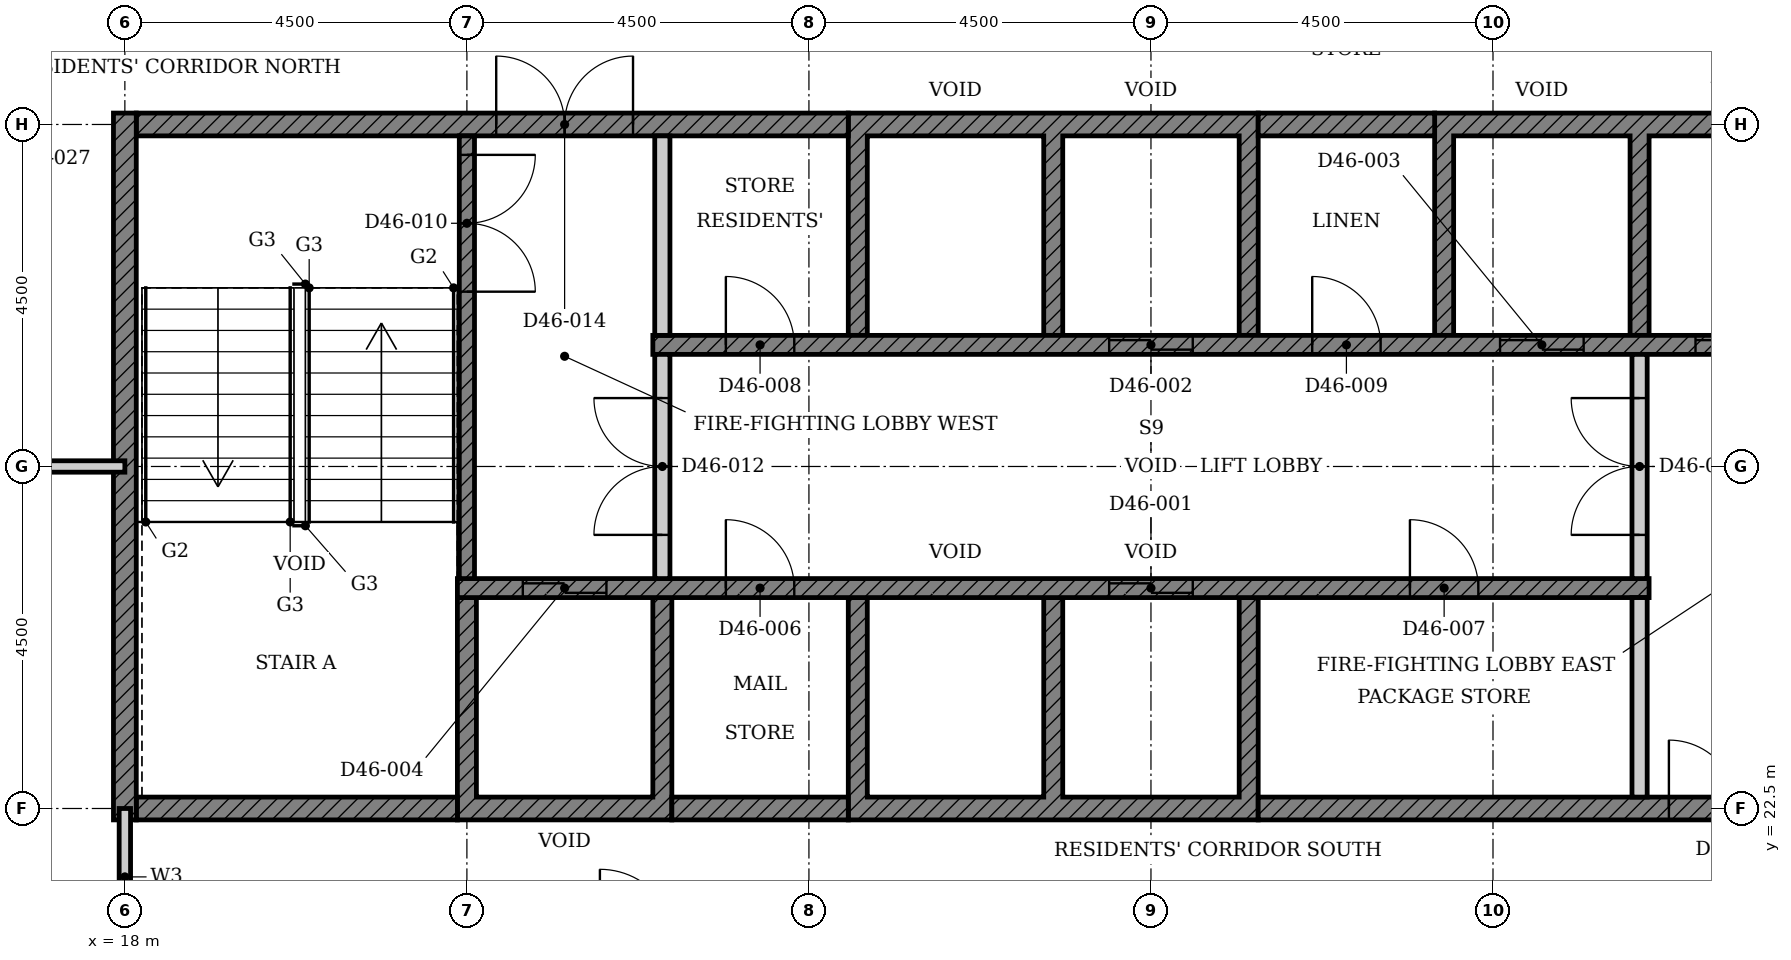
"""IFC4 building model, lengths in metres.
Left out: names, types, materials, properties, quantities, classifications, styles, units other than length and angle.
Written with IfcOpenShell. Run it as: python <this file> out.ifc"""

import sys

from ifc_helpers import new_model, si_unit, direction, frame, frame_2d, origin, place, context, subcontext, project, spatial, polyline, rectangle, outline, extrude, element, fill, save


model = new_model("IFC4")
c1 = context("Model", 3, precision=1e-05, world=origin(), true_north=direction((0.0, 1.0)))
c2 = subcontext(c1, "Body", "Model", "MODEL_VIEW")
j1 = project(units=[si_unit("LENGTHUNIT", "METRE"), si_unit("PLANEANGLEUNIT", "RADIAN")], contexts=[c1])
p1 = place(None, origin())
s1 = spatial("IfcSite", under=j1, at=p1, CompositionType="ELEMENT")
p2 = place(p1, origin())
s2 = spatial("IfcBuilding", under=s1, at=p2, CompositionType="ELEMENT")
p3 = place(p2, frame((0.0, 0.0, 183.9)))
s3 = spatial("IfcBuildingStorey", under=s2, at=p3, CompositionType="ELEMENT", Elevation=183.9)
p4 = place(p3, origin())
e1 = element("IfcWall", 1, at=p4, inside=s3, PredefinedType="SHEAR", context=c2, shape_type="SweptSolid", body=[
    extrude(outline(polyline([(22.375, 22.35), (25.197, 22.35), (25.197, 25.275), (24.947, 25.275), (24.947, 22.65), (22.625, 22.65), (22.625, 25.275), (22.375, 25.275), (22.375, 22.35)])), origin(), (0.0, 0.0, 1.0), 3.3),
])
p5 = place(p3, origin())
e2 = element("IfcWall", 2, at=p5, inside=s3, PredefinedType="SHEAR", context=c2, shape_type="SweptSolid", body=[
    extrude(outline(polyline([(27.518, 22.35), (32.911, 22.35), (32.911, 25.275), (32.661, 25.275), (32.661, 22.65), (30.339, 22.65), (30.339, 25.275), (30.089, 25.275), (30.089, 22.65), (27.768, 22.65), (27.768, 25.275), (27.518, 25.275), (27.518, 22.35)])), origin(), (0.0, 0.0, 1.0), 3.3),
])
p6 = place(p3, origin())
e3 = element("IfcWall", 3, at=p6, inside=s3, PredefinedType="SHEAR", context=c2, shape_type="SweptSolid", body=[
    extrude(outline(polyline([(27.518, 28.725), (27.768, 28.725), (27.768, 31.35), (30.089, 31.35), (30.089, 28.725), (30.339, 28.725), (30.339, 31.35), (32.661, 31.35), (32.661, 28.725), (32.911, 28.725), (32.911, 31.65), (27.518, 31.65), (27.518, 28.725)])), origin(), (0.0, 0.0, 1.0), 3.3),
])
p7 = place(p3, origin())
e4 = element("IfcWall", 4, at=p7, inside=s3, PredefinedType="SHEAR", context=c2, shape_type="SweptSolid", body=[
    extrude(outline(polyline([(35.232, 28.725), (35.482, 28.725), (35.482, 31.35), (37.803, 31.35), (37.803, 28.725), (38.053, 28.725), (38.053, 31.35), (40.375, 31.35), (40.375, 28.725), (40.625, 28.725), (40.625, 31.65), (35.232, 31.65), (35.232, 28.725)])), origin(), (0.0, 0.0, 1.0), 3.3),
])
p8 = place(p3, frame((18.15, 22.5, 0.0), z_axis=(0.0, 0.0, 1.0), x_axis=(1.0, 0.0, 0.0)))
e5 = element("IfcWall", 5, at=p8, inside=s3, PredefinedType="SHEAR", context=c2, shape_type="SweptSolid", body=[
    extrude(rectangle(XDim=4.225, YDim=0.3, at=frame_2d((2.113, 0.0))), origin(), (0.0, 0.0, 1.0), 3.3),
])
p9 = place(p3, frame((25.197, 22.5, 0.0), z_axis=(0.0, 0.0, 1.0), x_axis=(1.0, 0.0, 0.0)))
e6 = element("IfcWall", 6, at=p9, inside=s3, PredefinedType="SHEAR", context=c2, shape_type="SweptSolid", body=[
    extrude(rectangle(XDim=2.321, YDim=0.3, at=frame_2d((1.161, 0.0))), origin(), (0.0, 0.0, 1.0), 3.3),
])
p10 = place(p3, frame((32.911, 22.5, 0.0), z_axis=(0.0, 0.0, 1.0), x_axis=(1.0, 0.0, 0.0)))
e7 = element("IfcWall", 7, at=p10, inside=s3, PredefinedType="SHEAR", context=c2, shape_type="SweptSolid", body=[
    extrude(rectangle(XDim=11.939, YDim=0.3, at=frame_2d((5.97, 0.0))), origin(), (0.0, 0.0, 1.0), 3.3),
])
p11 = place(p10, frame((5.404, 0.0, 0.0)))
e8 = element("IfcOpeningElement", 8, at=p11, cuts=e7, PredefinedType="OPENING", context=c2, shape_type="SweptSolid", body=[
    extrude(rectangle(XDim=1.8, YDim=2.1, at=frame_2d((0.9, 1.05))), frame((0.0, 0.16, 0.0), z_axis=(0.0, -1.0, 0.0), x_axis=(1.0, 0.0, 0.0)), (0.0, 0.0, 1.0), 0.32),
])
p12 = place(p3, frame((18.15, 31.5, 0.0), z_axis=(0.0, 0.0, 1.0), x_axis=(1.0, 0.0, 0.0)))
e9 = element("IfcWall", 9, at=p12, inside=s3, PredefinedType="SHEAR", context=c2, shape_type="SweptSolid", body=[
    extrude(rectangle(XDim=9.368, YDim=0.3, at=frame_2d((4.684, 0.0))), origin(), (0.0, 0.0, 1.0), 3.3),
])
p13 = place(p12, frame((4.736, 0.0, 0.0)))
e10 = element("IfcOpeningElement", 10, at=p13, cuts=e9, PredefinedType="OPENING", context=c2, shape_type="SweptSolid", body=[
    extrude(rectangle(XDim=1.8, YDim=2.1, at=frame_2d((0.9, 1.05))), frame((0.0, 0.16, 0.0), z_axis=(0.0, -1.0, 0.0), x_axis=(1.0, 0.0, 0.0)), (0.0, 0.0, 1.0), 0.32),
])
p14 = place(p3, frame((32.911, 31.5, 0.0), z_axis=(0.0, 0.0, 1.0), x_axis=(1.0, 0.0, 0.0)))
e11 = element("IfcWall", 11, at=p14, inside=s3, PredefinedType="SHEAR", context=c2, shape_type="SweptSolid", body=[
    extrude(rectangle(XDim=2.322, YDim=0.3, at=frame_2d((1.161, 0.0))), origin(), (0.0, 0.0, 1.0), 3.3),
])
p15 = place(p3, frame((18.0, 22.35, 0.0), z_axis=(0.0, 0.0, 1.0), x_axis=(0.0, 1.0, 0.0)))
e12 = element("IfcWall", 12, at=p15, inside=s3, PredefinedType="SHEAR", context=c2, shape_type="SweptSolid", body=[
    extrude(rectangle(XDim=9.3, YDim=0.3, at=frame_2d((4.65, 0.0))), origin(), (0.0, 0.0, 1.0), 3.3),
])
p16 = place(p3, frame((22.375, 25.4, 0.0), z_axis=(0.0, 0.0, 1.0), x_axis=(1.0, 0.0, 0.0)))
e13 = element("IfcWall", 13, at=p16, inside=s3, PredefinedType="SHEAR", context=c2, shape_type="SweptSolid", body=[
    extrude(rectangle(XDim=15.678, YDim=0.25, at=frame_2d((7.839, 0.0))), origin(), (0.0, 0.0, 1.0), 3.3),
])
p17 = place(p16, frame((8.575, 0.0, 0.0)))
e14 = element("IfcOpeningElement", 14, at=p17, cuts=e13, PredefinedType="OPENING", context=c2, shape_type="SweptSolid", body=[
    extrude(rectangle(XDim=1.1, YDim=2.1, at=frame_2d((0.55, 1.05))), frame((0.0, 0.135, 0.0), z_axis=(0.0, -1.0, 0.0), x_axis=(1.0, 0.0, 0.0)), (0.0, 0.0, 1.0), 0.27),
])
p18 = place(p16, frame((0.861, 0.0, 0.0)))
e15 = element("IfcOpeningElement", 15, at=p18, cuts=e13, PredefinedType="OPENING", context=c2, shape_type="SweptSolid", body=[
    extrude(rectangle(XDim=1.1, YDim=2.1, at=frame_2d((0.55, 1.05))), frame((0.0, 0.135, 0.0), z_axis=(0.0, -1.0, 0.0), x_axis=(1.0, 0.0, 0.0)), (0.0, 0.0, 1.0), 0.27),
])
p19 = place(p16, frame((3.532, 0.0, 0.0)))
e16 = element("IfcOpeningElement", 16, at=p19, cuts=e13, PredefinedType="OPENING", context=c2, shape_type="SweptSolid", body=[
    extrude(rectangle(XDim=0.9, YDim=2.1, at=frame_2d((0.45, 1.05))), frame((0.0, 0.135, 0.0), z_axis=(0.0, -1.0, 0.0), x_axis=(1.0, 0.0, 0.0)), (0.0, 0.0, 1.0), 0.27),
])
p20 = place(p16, frame((12.532, 0.0, 0.0)))
e17 = element("IfcOpeningElement", 17, at=p20, cuts=e13, PredefinedType="OPENING", context=c2, shape_type="SweptSolid", body=[
    extrude(rectangle(XDim=0.9, YDim=2.1, at=frame_2d((0.45, 1.05))), frame((0.0, 0.135, 0.0), z_axis=(0.0, -1.0, 0.0), x_axis=(1.0, 0.0, 0.0)), (0.0, 0.0, 1.0), 0.27),
])
p21 = place(p3, frame((24.947, 28.6, 0.0), z_axis=(0.0, 0.0, 1.0), x_axis=(1.0, 0.0, 0.0)))
e18 = element("IfcWall", 18, at=p21, inside=s3, PredefinedType="SHEAR", context=c2, shape_type="SweptSolid", body=[
    extrude(rectangle(XDim=15.678, YDim=0.25, at=frame_2d((7.839, 0.0))), origin(), (0.0, 0.0, 1.0), 3.3),
])
p22 = place(p21, frame((6.004, 0.0, 0.0)))
e19 = element("IfcOpeningElement", 19, at=p22, cuts=e18, PredefinedType="OPENING", context=c2, shape_type="SweptSolid", body=[
    extrude(rectangle(XDim=1.1, YDim=2.1, at=frame_2d((0.55, 1.05))), frame((0.0, 0.135, 0.0), z_axis=(0.0, -1.0, 0.0), x_axis=(1.0, 0.0, 0.0)), (0.0, 0.0, 1.0), 0.27),
])
p23 = place(p21, frame((11.146, 0.0, 0.0)))
e20 = element("IfcOpeningElement", 20, at=p23, cuts=e18, PredefinedType="OPENING", context=c2, shape_type="SweptSolid", body=[
    extrude(rectangle(XDim=1.1, YDim=2.1, at=frame_2d((0.55, 1.05))), frame((0.0, 0.135, 0.0), z_axis=(0.0, -1.0, 0.0), x_axis=(1.0, 0.0, 0.0)), (0.0, 0.0, 1.0), 0.27),
])
p24 = place(p21, frame((13.718, 0.0, 0.0)))
e21 = element("IfcOpeningElement", 21, at=p24, cuts=e18, PredefinedType="OPENING", context=c2, shape_type="SweptSolid", body=[
    extrude(rectangle(XDim=1.1, YDim=2.1, at=frame_2d((0.55, 1.05))), frame((0.0, 0.135, 0.0), z_axis=(0.0, -1.0, 0.0), x_axis=(1.0, 0.0, 0.0)), (0.0, 0.0, 1.0), 0.27),
])
p25 = place(p21, frame((0.961, 0.0, 0.0)))
e22 = element("IfcOpeningElement", 22, at=p25, cuts=e18, PredefinedType="OPENING", context=c2, shape_type="SweptSolid", body=[
    extrude(rectangle(XDim=0.9, YDim=2.1, at=frame_2d((0.45, 1.05))), frame((0.0, 0.135, 0.0), z_axis=(0.0, -1.0, 0.0), x_axis=(1.0, 0.0, 0.0)), (0.0, 0.0, 1.0), 0.27),
])
p26 = place(p21, frame((8.675, 0.0, 0.0)))
e23 = element("IfcOpeningElement", 23, at=p26, cuts=e18, PredefinedType="OPENING", context=c2, shape_type="SweptSolid", body=[
    extrude(rectangle(XDim=0.9, YDim=2.1, at=frame_2d((0.45, 1.05))), frame((0.0, 0.135, 0.0), z_axis=(0.0, -1.0, 0.0), x_axis=(1.0, 0.0, 0.0)), (0.0, 0.0, 1.0), 0.27),
])
for number, where, z_axis, x_axis in (
    (24, (37.928, 22.65, 0.0), (0.0, 0.0, 1.0), (0.0, 1.0, 0.0)),
    (25, (25.072, 28.725, 0.0), (0.0, 0.0, 1.0), (0.0, 1.0, 0.0)),
):
    element("IfcWall", number, at=place(p3, frame(where, z_axis=z_axis, x_axis=x_axis)), inside=s3, PredefinedType="PARTITIONING", context=c2, shape_type="SweptSolid", body=[
        extrude(rectangle(XDim=2.625, YDim=0.2, at=frame_2d((1.312, 0.0))), origin(), (0.0, 0.0, 1.0), 3.3),
    ])
p27 = place(p3, frame((22.5, 31.35, 0.0), z_axis=(0.0, 0.0, 1.0), x_axis=(0.0, -1.0, 0.0)))
e26 = element("IfcWall", 26, at=p27, inside=s3, PredefinedType="SHEAR", context=c2, shape_type="SweptSolid", body=[
    extrude(rectangle(XDim=5.825, YDim=0.2, at=frame_2d((2.913, 0.0))), origin(), (0.0, 0.0, 1.0), 3.3),
])
p28 = place(p27, frame((0.25, 0.0, 0.0)))
e27 = element("IfcOpeningElement", 27, at=p28, cuts=e26, PredefinedType="OPENING", context=c2, shape_type="SweptSolid", body=[
    extrude(rectangle(XDim=1.8, YDim=2.1, at=frame_2d((0.9, 1.05))), frame((0.0, 0.11, 0.0), z_axis=(0.0, -1.0, 0.0), x_axis=(1.0, 0.0, 0.0)), (0.0, 0.0, 1.0), 0.22),
])
p29 = place(p3, frame((25.072, 25.525, 0.0), z_axis=(0.0, 0.0, 1.0), x_axis=(0.0, 1.0, 0.0)))
e28 = element("IfcWall", 28, at=p29, inside=s3, PredefinedType="PARTITIONING", context=c2, shape_type="SweptSolid", body=[
    extrude(rectangle(XDim=2.95, YDim=0.2, at=frame_2d((1.475, 0.0))), origin(), (0.0, 0.0, 1.0), 3.3),
])
p30 = place(p29, frame((0.575, 0.0, 0.0)))
e29 = element("IfcOpeningElement", 29, at=p30, cuts=e28, PredefinedType="OPENING", context=c2, shape_type="SweptSolid", body=[
    extrude(rectangle(XDim=1.8, YDim=2.1, at=frame_2d((0.9, 1.05))), frame((0.0, 0.11, 0.0), z_axis=(0.0, -1.0, 0.0), x_axis=(1.0, 0.0, 0.0)), (0.0, 0.0, 1.0), 0.22),
])
p31 = place(p3, frame((37.928, 25.525, 0.0), z_axis=(0.0, 0.0, 1.0), x_axis=(0.0, 1.0, 0.0)))
e30 = element("IfcWall", 30, at=p31, inside=s3, PredefinedType="PARTITIONING", context=c2, shape_type="SweptSolid", body=[
    extrude(rectangle(XDim=2.95, YDim=0.2, at=frame_2d((1.475, 0.0))), origin(), (0.0, 0.0, 1.0), 3.3),
])
p32 = place(p31, frame((0.575, 0.0, 0.0)))
e31 = element("IfcOpeningElement", 31, at=p32, cuts=e30, PredefinedType="OPENING", context=c2, shape_type="SweptSolid", body=[
    extrude(rectangle(XDim=1.8, YDim=2.1, at=frame_2d((0.9, 1.05))), frame((0.0, 0.11, 0.0), z_axis=(0.0, -1.0, 0.0), x_axis=(1.0, 0.0, 0.0)), (0.0, 0.0, 1.0), 0.22),
])
p33 = place(p3, frame((4.5, 27.0, 0.0), z_axis=(0.0, 0.0, 1.0), x_axis=(1.0, 0.0, 0.0)))
e32 = element("IfcWall", 32, at=p33, inside=s3, PredefinedType="PARTITIONING", context=c2, shape_type="SweptSolid", body=[
    extrude(rectangle(XDim=13.5, YDim=0.15, at=frame_2d((6.75, 0.0))), origin(), (0.0, 0.0, 1.0), 2.58),
])
p34 = place(p33, frame((5.35, 0.0, 0.0)))
e33 = element("IfcOpeningElement", 33, at=p34, cuts=e32, PredefinedType="OPENING", context=c2, shape_type="SweptSolid", body=[
    extrude(rectangle(XDim=1.0, YDim=2.1, at=frame_2d((0.5, 1.05))), frame((0.0, 0.085, 0.0), z_axis=(0.0, -1.0, 0.0), x_axis=(1.0, 0.0, 0.0)), (0.0, 0.0, 1.0), 0.17),
])
p35 = place(p3, frame((18.0, 20.7, 0.0), z_axis=(0.0, 0.0, 1.0), x_axis=(0.0, 1.0, 0.0)))
e34 = element("IfcWall", 34, at=p35, inside=s3, PredefinedType="PARTITIONING", context=c2, shape_type="SweptSolid", body=[
    extrude(rectangle(XDim=1.8, YDim=0.15, at=frame_2d((0.9, 0.0))), origin(), (0.0, 0.0, 1.0), 3.3),
])
p36 = place(p17, origin())
e35 = element("IfcDoor", 35, at=p36, inside=s3, OperationType="DOUBLE_DOOR_SLIDING", PredefinedType="DOOR", context=c2, shape_type="SweptSolid", body=[
    extrude(rectangle(XDim=1.1, YDim=2.1, at=frame_2d((0.55, 1.05))), frame((0.0, 0.025, 0.0), z_axis=(0.0, -1.0, 0.0), x_axis=(1.0, 0.0, 0.0)), (0.0, 0.0, 1.0), 0.05),
])
fill(e14, e35)
p37 = place(p22, origin())
e36 = element("IfcDoor", 36, at=p37, inside=s3, OperationType="DOUBLE_DOOR_SLIDING", PredefinedType="DOOR", context=c2, shape_type="SweptSolid", body=[
    extrude(rectangle(XDim=1.1, YDim=2.1, at=frame_2d((0.55, 1.05))), frame((0.0, 0.025, 0.0), z_axis=(0.0, -1.0, 0.0), x_axis=(1.0, 0.0, 0.0)), (0.0, 0.0, 1.0), 0.05),
])
fill(e19, e36)
p38 = place(p23, origin())
e37 = element("IfcDoor", 37, at=p38, inside=s3, OperationType="DOUBLE_DOOR_SLIDING", PredefinedType="DOOR", context=c2, shape_type="SweptSolid", body=[
    extrude(rectangle(XDim=1.1, YDim=2.1, at=frame_2d((0.55, 1.05))), frame((0.0, 0.025, 0.0), z_axis=(0.0, -1.0, 0.0), x_axis=(1.0, 0.0, 0.0)), (0.0, 0.0, 1.0), 0.05),
])
fill(e20, e37)
p39 = place(p18, origin())
e38 = element("IfcDoor", 38, at=p39, inside=s3, OperationType="DOUBLE_DOOR_SLIDING", PredefinedType="DOOR", context=c2, shape_type="SweptSolid", body=[
    extrude(rectangle(XDim=1.1, YDim=2.1, at=frame_2d((0.55, 1.05))), frame((0.0, 0.025, 0.0), z_axis=(0.0, -1.0, 0.0), x_axis=(1.0, 0.0, 0.0)), (0.0, 0.0, 1.0), 0.05),
])
fill(e15, e38)
p40 = place(p24, origin())
e39 = element("IfcDoor", 39, at=p40, inside=s3, OperationType="DOUBLE_DOOR_SLIDING", PredefinedType="DOOR", context=c2, shape_type="SweptSolid", body=[
    extrude(rectangle(XDim=1.1, YDim=2.1, at=frame_2d((0.55, 1.05))), frame((0.0, 0.025, 0.0), z_axis=(0.0, -1.0, 0.0), x_axis=(1.0, 0.0, 0.0)), (0.0, 0.0, 1.0), 0.05),
])
fill(e21, e39)
p41 = place(p19, origin())
e40 = element("IfcDoor", 40, at=p41, inside=s3, OperationType="SINGLE_SWING_LEFT", PredefinedType="DOOR", context=c2, shape_type="SweptSolid", body=[
    extrude(rectangle(XDim=0.9, YDim=2.1, at=frame_2d((0.45, 1.05))), frame((0.0, 0.025, 0.0), z_axis=(0.0, -1.0, 0.0), x_axis=(1.0, 0.0, 0.0)), (0.0, 0.0, 1.0), 0.05),
])
fill(e16, e40)
p42 = place(p20, origin())
e41 = element("IfcDoor", 41, at=p42, inside=s3, OperationType="SINGLE_SWING_LEFT", PredefinedType="DOOR", context=c2, shape_type="SweptSolid", body=[
    extrude(rectangle(XDim=0.9, YDim=2.1, at=frame_2d((0.45, 1.05))), frame((0.0, 0.025, 0.0), z_axis=(0.0, -1.0, 0.0), x_axis=(1.0, 0.0, 0.0)), (0.0, 0.0, 1.0), 0.05),
])
fill(e17, e41)
p43 = place(p25, origin())
e42 = element("IfcDoor", 42, at=p43, inside=s3, OperationType="SINGLE_SWING_LEFT", PredefinedType="DOOR", context=c2, shape_type="SweptSolid", body=[
    extrude(rectangle(XDim=0.9, YDim=2.1, at=frame_2d((0.45, 1.05))), frame((0.0, 0.025, 0.0), z_axis=(0.0, -1.0, 0.0), x_axis=(1.0, 0.0, 0.0)), (0.0, 0.0, 1.0), 0.05),
])
fill(e22, e42)
p44 = place(p26, origin())
e43 = element("IfcDoor", 43, at=p44, inside=s3, OperationType="SINGLE_SWING_LEFT", PredefinedType="DOOR", context=c2, shape_type="SweptSolid", body=[
    extrude(rectangle(XDim=0.9, YDim=2.1, at=frame_2d((0.45, 1.05))), frame((0.0, 0.025, 0.0), z_axis=(0.0, -1.0, 0.0), x_axis=(1.0, 0.0, 0.0)), (0.0, 0.0, 1.0), 0.05),
])
fill(e23, e43)
p45 = place(p28, origin())
e44 = element("IfcDoor", 44, at=p45, inside=s3, OperationType="DOUBLE_DOOR_SINGLE_SWING", PredefinedType="DOOR", context=c2, shape_type="SweptSolid", body=[
    extrude(rectangle(XDim=1.8, YDim=2.1, at=frame_2d((0.9, 1.05))), frame((0.0, 0.025, 0.0), z_axis=(0.0, -1.0, 0.0), x_axis=(1.0, 0.0, 0.0)), (0.0, 0.0, 1.0), 0.05),
])
fill(e27, e44)
p46 = place(p30, origin())
e45 = element("IfcDoor", 45, at=p46, inside=s3, OperationType="DOUBLE_DOOR_SINGLE_SWING", PredefinedType="DOOR", context=c2, shape_type="SweptSolid", body=[
    extrude(rectangle(XDim=1.8, YDim=2.1, at=frame_2d((0.9, 1.05))), frame((0.0, 0.025, 0.0), z_axis=(0.0, -1.0, 0.0), x_axis=(1.0, 0.0, 0.0)), (0.0, 0.0, 1.0), 0.05),
])
fill(e29, e45)
p47 = place(p32, origin())
e46 = element("IfcDoor", 46, at=p47, inside=s3, OperationType="DOUBLE_DOOR_SINGLE_SWING", PredefinedType="DOOR", context=c2, shape_type="SweptSolid", body=[
    extrude(rectangle(XDim=1.8, YDim=2.1, at=frame_2d((0.9, 1.05))), frame((0.0, 0.025, 0.0), z_axis=(0.0, -1.0, 0.0), x_axis=(1.0, 0.0, 0.0)), (0.0, 0.0, 1.0), 0.05),
])
fill(e31, e46)
p48 = place(p13, origin())
e47 = element("IfcDoor", 47, at=p48, inside=s3, OperationType="DOUBLE_DOOR_SINGLE_SWING", PredefinedType="DOOR", context=c2, shape_type="SweptSolid", body=[
    extrude(rectangle(XDim=1.8, YDim=2.1, at=frame_2d((0.9, 1.05))), frame((0.0, 0.025, 0.0), z_axis=(0.0, -1.0, 0.0), x_axis=(1.0, 0.0, 0.0)), (0.0, 0.0, 1.0), 0.05),
])
fill(e10, e47)
p49 = place(p11, origin())
e48 = element("IfcDoor", 48, at=p49, inside=s3, OperationType="DOUBLE_DOOR_SINGLE_SWING", PredefinedType="DOOR", context=c2, shape_type="SweptSolid", body=[
    extrude(rectangle(XDim=1.8, YDim=2.1, at=frame_2d((0.9, 1.05))), frame((0.0, 0.025, 0.0), z_axis=(0.0, -1.0, 0.0), x_axis=(1.0, 0.0, 0.0)), (0.0, 0.0, 1.0), 0.05),
])
fill(e8, e48)
save(model, sys.argv[1])
